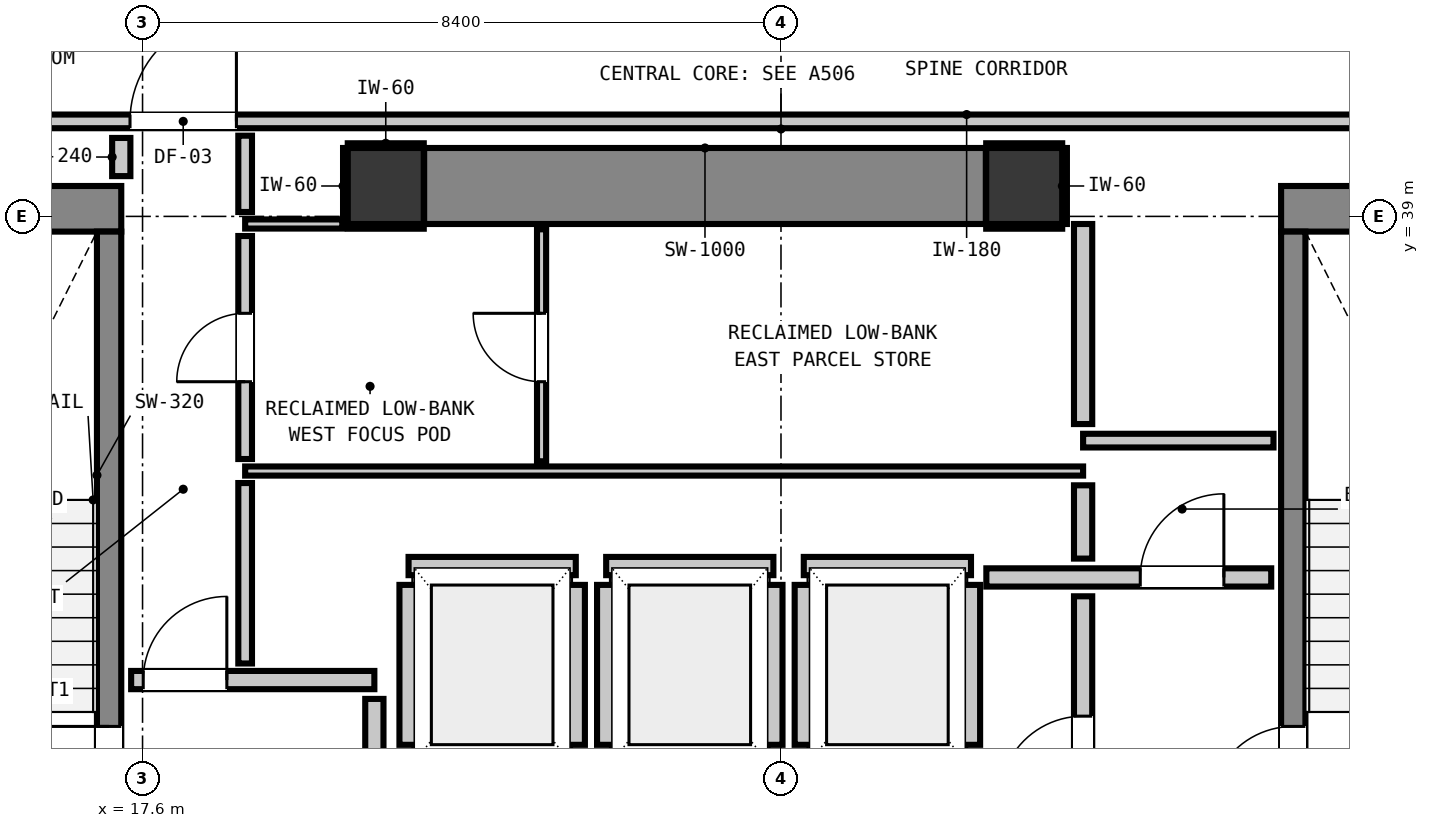
"""IFC4 building model, lengths in metres.
Left out: names, types, materials, properties, quantities, classifications, styles, units other than length and angle.
Written with IfcOpenShell. Run it as: python <this file> out.ifc"""

import sys

from ifc_helpers import new_model, si_unit, direction, frame, frame_2d, origin, origin_2d, place, context, subcontext, project, spatial, rectangle, extrude, element, fill, save


model = new_model("IFC4")
c1 = context("Model", 3, precision=1e-05, world=origin(), true_north=direction((0.0, 1.0)))
c2 = subcontext(c1, "Body", "Model", "MODEL_VIEW")
j1 = project(units=[si_unit("LENGTHUNIT", "METRE"), si_unit("PLANEANGLEUNIT", "RADIAN")], contexts=[c1])
p1 = place(None, origin())
s1 = spatial("IfcSite", under=j1, at=p1, CompositionType="ELEMENT")
p2 = place(p1, origin())
s2 = spatial("IfcBuilding", under=s1, at=p2, CompositionType="ELEMENT")
p3 = place(p2, frame((0.0, 0.0, 112.72)))
s3 = spatial("IfcBuildingStorey", under=s2, at=p3, CompositionType="ELEMENT", Elevation=112.72)
for number, where, z_axis, x_axis in (
    (1, (20.8, 39.4, 0.0), (0.0, 0.0, 1.0), (1.0, 0.0, 0.0)),
    (2, (29.2, 39.4, 0.0), (0.0, 0.0, 1.0), (1.0, 0.0, 0.0)),
):
    element("IfcColumn", number, at=place(p3, frame(where, z_axis=z_axis, x_axis=x_axis)), inside=s3, PredefinedType="COLUMN", context=c2, shape_type="SweptSolid", body=[
        extrude(rectangle(XDim=1.0, YDim=1.0, at=origin_2d()), origin(), (0.0, 0.0, 1.0), 3.32),
    ])
p4 = place(p3, frame((13.24, 39.1, 0.0), z_axis=(0.0, 0.0, 1.0), x_axis=(1.0, 0.0, 0.0)))
e3 = element("IfcWall", 3, at=p4, inside=s3, PredefinedType="SHEAR", context=c2, shape_type="SweptSolid", body=[
    extrude(rectangle(XDim=4.08, YDim=0.6, at=frame_2d((2.04, 0.0))), origin(), (0.0, 0.0, 1.0), 3.32),
])
p5 = place(p3, frame((32.58, 39.1, 0.0), z_axis=(0.0, 0.0, 1.0), x_axis=(1.0, 0.0, 0.0)))
e4 = element("IfcWall", 4, at=p5, inside=s3, PredefinedType="SHEAR", context=c2, shape_type="SweptSolid", body=[
    extrude(rectangle(XDim=4.08, YDim=0.6, at=frame_2d((2.04, 0.0))), origin(), (0.0, 0.0, 1.0), 3.32),
])
p6 = place(p3, frame((21.305, 39.4, 0.0), z_axis=(0.0, 0.0, 1.0), x_axis=(1.0, 0.0, 0.0)))
e5 = element("IfcWall", 5, at=p6, inside=s3, PredefinedType="SHEAR", context=c2, shape_type="SweptSolid", body=[
    extrude(rectangle(XDim=7.39, YDim=1.0, at=frame_2d((3.695, 0.0))), origin(), (0.0, 0.0, 1.0), 3.32),
])
p7 = place(p3, frame((17.16, 31.0, 0.0), z_axis=(0.0, 0.0, 1.0), x_axis=(0.0, 1.0, 0.0)))
e6 = element("IfcWall", 6, at=p7, inside=s3, PredefinedType="SHEAR", context=c2, shape_type="SweptSolid", body=[
    extrude(rectangle(XDim=7.8, YDim=0.32, at=frame_2d((3.9, 0.0))), origin(), (0.0, 0.0, 1.0), 3.32),
])
p8 = place(p7, frame((0.19, 0.0, 0.0)))
e7 = element("IfcOpeningElement", 7, at=p8, cuts=e6, PredefinedType="OPENING", context=c2, shape_type="SweptSolid", body=[
    extrude(rectangle(XDim=1.1, YDim=2.15, at=frame_2d((0.55, 1.075))), frame((0.0, 0.17, 0.0), z_axis=(0.0, -1.0, 0.0), x_axis=(1.0, 0.0, 0.0)), (0.0, 0.0, 1.0), 0.34),
])
p9 = place(p3, frame((32.74, 31.0, 0.0), z_axis=(0.0, 0.0, 1.0), x_axis=(0.0, 1.0, 0.0)))
e8 = element("IfcWall", 8, at=p9, inside=s3, PredefinedType="SHEAR", context=c2, shape_type="SweptSolid", body=[
    extrude(rectangle(XDim=7.8, YDim=0.32, at=frame_2d((3.9, 0.0))), origin(), (0.0, 0.0, 1.0), 3.32),
])
p10 = place(p9, frame((0.19, 0.0, 0.0)))
e9 = element("IfcOpeningElement", 9, at=p10, cuts=e8, PredefinedType="OPENING", context=c2, shape_type="SweptSolid", body=[
    extrude(rectangle(XDim=1.1, YDim=2.15, at=frame_2d((0.55, 1.075))), frame((0.0, 0.17, 0.0), z_axis=(0.0, -1.0, 0.0), x_axis=(1.0, 0.0, 0.0)), (0.0, 0.0, 1.0), 0.34),
])
p11 = place(p3, frame((21.1, 34.4, 0.0), z_axis=(0.0, 0.0, 1.0), x_axis=(1.0, 0.0, 0.0)))
e10 = element("IfcWall", 10, at=p11, inside=s3, PredefinedType="PARTITIONING", context=c2, shape_type="SweptSolid", body=[
    extrude(rectangle(XDim=2.2, YDim=0.24, at=frame_2d((1.1, 0.0))), origin(), (0.0, 0.0, 1.0), 3.08),
])
p12 = place(p3, frame((21.1, 32.048, 0.0), z_axis=(0.0, 0.0, 1.0), x_axis=(0.0, 1.0, 0.0)))
e11 = element("IfcWall", 11, at=p12, inside=s3, PredefinedType="PARTITIONING", context=c2, shape_type="SweptSolid", body=[
    extrude(rectangle(XDim=2.104, YDim=0.24, at=frame_2d((1.052, 0.0))), origin(), (0.0, 0.0, 1.0), 2.315),
])
p13 = place(p3, frame((23.3, 32.048, 0.0), z_axis=(0.0, 0.0, 1.0), x_axis=(0.0, 1.0, 0.0)))
e12 = element("IfcWall", 12, at=p13, inside=s3, PredefinedType="PARTITIONING", context=c2, shape_type="SweptSolid", body=[
    extrude(rectangle(XDim=2.104, YDim=0.24, at=frame_2d((1.052, 0.0))), origin(), (0.0, 0.0, 1.0), 3.08),
])
p14 = place(p3, frame((23.7, 34.4, 0.0), z_axis=(0.0, 0.0, 1.0), x_axis=(1.0, 0.0, 0.0)))
e13 = element("IfcWall", 13, at=p14, inside=s3, PredefinedType="PARTITIONING", context=c2, shape_type="SweptSolid", body=[
    extrude(rectangle(XDim=2.2, YDim=0.24, at=frame_2d((1.1, 0.0))), origin(), (0.0, 0.0, 1.0), 3.08),
])
for number, where, z_axis, x_axis in (
    (14, (23.7, 32.048, 0.0), (0.0, 0.0, 1.0), (0.0, 1.0, 0.0)),
    (15, (25.9, 32.048, 0.0), (0.0, 0.0, 1.0), (0.0, 1.0, 0.0)),
):
    element("IfcWall", number, at=place(p3, frame(where, z_axis=z_axis, x_axis=x_axis)), inside=s3, PredefinedType="PARTITIONING", context=c2, shape_type="SweptSolid", body=[
        extrude(rectangle(XDim=2.104, YDim=0.24, at=frame_2d((1.052, 0.0))), origin(), (0.0, 0.0, 1.0), 3.08),
    ])
p15 = place(p3, frame((26.3, 34.4, 0.0), z_axis=(0.0, 0.0, 1.0), x_axis=(1.0, 0.0, 0.0)))
e16 = element("IfcWall", 16, at=p15, inside=s3, PredefinedType="PARTITIONING", context=c2, shape_type="SweptSolid", body=[
    extrude(rectangle(XDim=2.2, YDim=0.24, at=frame_2d((1.1, 0.0))), origin(), (0.0, 0.0, 1.0), 3.08),
])
for number, where, z_axis, x_axis in (
    (17, (26.3, 32.048, 0.0), (0.0, 0.0, 1.0), (0.0, 1.0, 0.0)),
    (18, (28.5, 32.048, 0.0), (0.0, 0.0, 1.0), (0.0, 1.0, 0.0)),
):
    element("IfcWall", number, at=place(p3, frame(where, z_axis=z_axis, x_axis=x_axis)), inside=s3, PredefinedType="PARTITIONING", context=c2, shape_type="SweptSolid", body=[
        extrude(rectangle(XDim=2.104, YDim=0.24, at=frame_2d((1.052, 0.0))), origin(), (0.0, 0.0, 1.0), 3.08),
    ])
p16 = place(p3, frame((17.45, 32.9, 0.0), z_axis=(0.0, 0.0, 1.0), x_axis=(1.0, 0.0, 0.0)))
e19 = element("IfcWall", 19, at=p16, inside=s3, PredefinedType="PARTITIONING", context=c2, shape_type="SweptSolid", body=[
    extrude(rectangle(XDim=3.2, YDim=0.24, at=frame_2d((1.6, 0.0))), origin(), (0.0, 0.0, 1.0), 3.08),
])
p17 = place(p16, frame((0.159, 0.0, 0.0)))
e20 = element("IfcOpeningElement", 20, at=p17, cuts=e19, PredefinedType="OPENING", context=c2, shape_type="SweptSolid", body=[
    extrude(rectangle(XDim=1.1, YDim=2.15, at=frame_2d((0.55, 1.075))), frame((0.0, 0.13, 0.0), z_axis=(0.0, -1.0, 0.0), x_axis=(1.0, 0.0, 0.0)), (0.0, 0.0, 1.0), 0.26),
])
p18 = place(p3, frame((28.702, 34.25, 0.0), z_axis=(0.0, 0.0, 1.0), x_axis=(1.0, 0.0, 0.0)))
e21 = element("IfcWall", 21, at=p18, inside=s3, PredefinedType="PARTITIONING", context=c2, shape_type="SweptSolid", body=[
    extrude(rectangle(XDim=3.748, YDim=0.24, at=frame_2d((1.874, 0.0))), origin(), (0.0, 0.0, 1.0), 3.08),
])
p19 = place(p18, frame((2.025, 0.0, 0.0)))
e22 = element("IfcOpeningElement", 22, at=p19, cuts=e21, PredefinedType="OPENING", context=c2, shape_type="SweptSolid", body=[
    extrude(rectangle(XDim=1.1, YDim=2.15, at=frame_2d((0.55, 1.075))), frame((0.0, 0.13, 0.0), z_axis=(0.0, -1.0, 0.0), x_axis=(1.0, 0.0, 0.0)), (0.0, 0.0, 1.0), 0.26),
])
p20 = place(p3, frame((29.975, 36.05, 0.0), z_axis=(0.0, 0.0, 1.0), x_axis=(1.0, 0.0, 0.0)))
e23 = element("IfcWall", 23, at=p20, inside=s3, PredefinedType="PARTITIONING", context=c2, shape_type="SweptSolid", body=[
    extrude(rectangle(XDim=2.505, YDim=0.18, at=frame_2d((1.252, 0.0))), origin(), (0.0, 0.0, 1.0), 3.08),
])
p21 = place(p3, frame((12.979, 40.25, 0.0), z_axis=(0.0, 0.0, 1.0), x_axis=(1.0, 0.0, 0.0)))
e24 = element("IfcWall", 24, at=p21, inside=s3, PredefinedType="PARTITIONING", context=c2, shape_type="SweptSolid", body=[
    extrude(rectangle(XDim=29.614, YDim=0.18, at=frame_2d((14.807, 0.0))), origin(), (0.0, 0.0, 1.0), 3.08),
])
p22 = place(p21, frame((4.456, 0.0, 0.0)))
e25 = element("IfcOpeningElement", 25, at=p22, cuts=e24, PredefinedType="OPENING", context=c2, shape_type="SweptSolid", body=[
    extrude(rectangle(XDim=1.4, YDim=2.15, at=frame_2d((0.7, 1.075))), frame((0.0, 0.1, 0.0), z_axis=(0.0, -1.0, 0.0), x_axis=(1.0, 0.0, 0.0)), (0.0, 0.0, 1.0), 0.2),
])
p23 = place(p21, frame((25.071, 0.0, 0.0)))
e26 = element("IfcOpeningElement", 26, at=p23, cuts=e24, PredefinedType="OPENING", context=c2, shape_type="SweptSolid", body=[
    extrude(rectangle(XDim=1.4, YDim=2.15, at=frame_2d((0.7, 1.075))), frame((0.0, 0.1, 0.0), z_axis=(0.0, -1.0, 0.0), x_axis=(1.0, 0.0, 0.0)), (0.0, 0.0, 1.0), 0.2),
])
p24 = place(p3, frame((18.95, 35.65, 0.0), z_axis=(0.0, 0.0, 1.0), x_axis=(1.0, 0.0, 0.0)))
e27 = element("IfcWall", 27, at=p24, inside=s3, PredefinedType="PARTITIONING", context=c2, shape_type="SweptSolid", body=[
    extrude(rectangle(XDim=11.025, YDim=0.12, at=frame_2d((5.513, 0.0))), origin(), (0.0, 0.0, 1.0), 3.08),
])
p25 = place(p3, frame((18.95, 38.9, 0.0), z_axis=(0.0, 0.0, 1.0), x_axis=(1.0, 0.0, 0.0)))
e28 = element("IfcWall", 28, at=p25, inside=s3, PredefinedType="PARTITIONING", context=c2, shape_type="SweptSolid", body=[
    extrude(rectangle(XDim=1.278, YDim=0.12, at=frame_2d((0.639, 0.0))), origin(), (0.0, 0.0, 1.0), 3.08),
])
p26 = place(p3, frame((17.32, 39.53, 0.0), z_axis=(0.0, 0.0, 1.0), x_axis=(0.0, 1.0, 0.0)))
e29 = element("IfcWall", 29, at=p26, inside=s3, PredefinedType="PARTITIONING", context=c2, shape_type="SweptSolid", body=[
    extrude(rectangle(XDim=0.502, YDim=0.24, at=frame_2d((0.251, 0.0))), origin(), (0.0, 0.0, 1.0), 3.08),
])
p27 = place(p3, frame((20.65, 31.868, 0.0), z_axis=(0.0, 0.0, 1.0), x_axis=(0.0, 1.0, 0.0)))
e30 = element("IfcWall", 30, at=p27, inside=s3, PredefinedType="PARTITIONING", context=c2, shape_type="SweptSolid", body=[
    extrude(rectangle(XDim=0.784, YDim=0.24, at=frame_2d((0.392, 0.0))), origin(), (0.0, 0.0, 1.0), 2.315),
])
p28 = place(p3, frame((29.975, 29.768, 0.0), z_axis=(0.0, 0.0, 1.0), x_axis=(0.0, 1.0, 0.0)))
e31 = element("IfcWall", 31, at=p28, inside=s3, PredefinedType="PARTITIONING", context=c2, shape_type="SweptSolid", body=[
    extrude(rectangle(XDim=4.234, YDim=0.24, at=frame_2d((2.117, 0.0))), origin(), (0.0, 0.0, 1.0), 3.08),
])
p29 = place(p28, frame((1.557, 0.0, 0.0)))
e32 = element("IfcOpeningElement", 32, at=p29, cuts=e31, PredefinedType="OPENING", context=c2, shape_type="SweptSolid", body=[
    extrude(rectangle(XDim=1.1, YDim=2.15, at=frame_2d((0.55, 1.075))), frame((0.0, 0.13, 0.0), z_axis=(0.0, -1.0, 0.0), x_axis=(1.0, 0.0, 0.0)), (0.0, 0.0, 1.0), 0.26),
])
p30 = place(p3, frame((29.975, 34.498, 0.0), z_axis=(0.0, 0.0, 1.0), x_axis=(0.0, 1.0, 0.0)))
e33 = element("IfcWall", 33, at=p30, inside=s3, PredefinedType="PARTITIONING", context=c2, shape_type="SweptSolid", body=[
    extrude(rectangle(XDim=0.964, YDim=0.24, at=frame_2d((0.482, 0.0))), origin(), (0.0, 0.0, 1.0), 3.08),
])
p31 = place(p3, frame((29.975, 36.268, 0.0), z_axis=(0.0, 0.0, 1.0), x_axis=(0.0, 1.0, 0.0)))
e34 = element("IfcWall", 34, at=p31, inside=s3, PredefinedType="PARTITIONING", context=c2, shape_type="SweptSolid", body=[
    extrude(rectangle(XDim=2.632, YDim=0.24, at=frame_2d((1.316, 0.0))), origin(), (0.0, 0.0, 1.0), 3.08),
])
p32 = place(p3, frame((18.95, 33.118, 0.0), z_axis=(0.0, 0.0, 1.0), x_axis=(0.0, 1.0, 0.0)))
e35 = element("IfcWall", 35, at=p32, inside=s3, PredefinedType="PARTITIONING", context=c2, shape_type="SweptSolid", body=[
    extrude(rectangle(XDim=2.374, YDim=0.18, at=frame_2d((1.187, 0.0))), origin(), (0.0, 0.0, 1.0), 3.08),
])
p33 = place(p3, frame((18.95, 35.808, 0.0), z_axis=(0.0, 0.0, 1.0), x_axis=(0.0, 1.0, 0.0)))
e36 = element("IfcWall", 36, at=p33, inside=s3, PredefinedType="PARTITIONING", context=c2, shape_type="SweptSolid", body=[
    extrude(rectangle(XDim=2.934, YDim=0.18, at=frame_2d((1.467, 0.0))), origin(), (0.0, 0.0, 1.0), 3.08),
])
p34 = place(p33, frame((1.017, 0.0, 0.0)))
e37 = element("IfcOpeningElement", 37, at=p34, cuts=e36, PredefinedType="OPENING", context=c2, shape_type="SweptSolid", body=[
    extrude(rectangle(XDim=0.9, YDim=2.1, at=frame_2d((0.45, 1.05))), frame((0.0, 0.1, 0.0), z_axis=(0.0, -1.0, 0.0), x_axis=(1.0, 0.0, 0.0)), (0.0, 0.0, 1.0), 0.2),
])
p35 = place(p3, frame((18.95, 39.058, 0.0), z_axis=(0.0, 0.0, 1.0), x_axis=(0.0, 1.0, 0.0)))
e38 = element("IfcWall", 38, at=p35, inside=s3, PredefinedType="PARTITIONING", context=c2, shape_type="SweptSolid", body=[
    extrude(rectangle(XDim=1.004, YDim=0.18, at=frame_2d((0.502, 0.0))), origin(), (0.0, 0.0, 1.0), 3.08),
])
p36 = place(p3, frame((22.85, 35.778, 0.0), z_axis=(0.0, 0.0, 1.0), x_axis=(0.0, 1.0, 0.0)))
e39 = element("IfcWall", 39, at=p36, inside=s3, PredefinedType="PARTITIONING", context=c2, shape_type="SweptSolid", body=[
    extrude(rectangle(XDim=3.052, YDim=0.12, at=frame_2d((1.526, 0.0))), origin(), (0.0, 0.0, 1.0), 3.08),
])
p37 = place(p36, frame((1.047, 0.0, 0.0)))
e40 = element("IfcOpeningElement", 40, at=p37, cuts=e39, PredefinedType="OPENING", context=c2, shape_type="SweptSolid", body=[
    extrude(rectangle(XDim=0.9, YDim=2.1, at=frame_2d((0.45, 1.05))), frame((0.0, 0.07, 0.0), z_axis=(0.0, -1.0, 0.0), x_axis=(1.0, 0.0, 0.0)), (0.0, 0.0, 1.0), 0.14),
])
for number, where, z_axis, x_axis in (
    (41, (20.3, 38.868, 0.0), (0.0, 0.0, 1.0), (1.0, 0.0, 0.0)),
    (42, (20.3, 39.932, 0.0), (0.0, 0.0, 1.0), (1.0, 0.0, 0.0)),
    (43, (20.268, 38.9, 0.0), (0.0, 0.0, 1.0), (0.0, 1.0, 0.0)),
    (44, (28.7, 38.868, 0.0), (0.0, 0.0, 1.0), (1.0, 0.0, 0.0)),
    (45, (28.7, 39.932, 0.0), (0.0, 0.0, 1.0), (1.0, 0.0, 0.0)),
    (46, (29.732, 38.9, 0.0), (0.0, 0.0, 1.0), (0.0, 1.0, 0.0)),
):
    element("IfcWall", number, at=place(p3, frame(where, z_axis=z_axis, x_axis=x_axis)), inside=s3, PredefinedType="PARTITIONING", context=c2, shape_type="SweptSolid", body=[
        extrude(rectangle(XDim=1.0, YDim=0.06, at=frame_2d((0.5, 0.0))), origin(), (0.0, 0.0, 1.0), 1.45),
    ])
p38 = place(p8, origin())
e47 = element("IfcDoor", 47, at=p38, inside=s3, OperationType="SINGLE_SWING_RIGHT", PredefinedType="DOOR", context=c2, shape_type="SweptSolid", body=[
    extrude(rectangle(XDim=1.1, YDim=2.15, at=frame_2d((0.55, 1.075))), frame((0.0, 0.025, 0.0), z_axis=(0.0, -1.0, 0.0), x_axis=(1.0, 0.0, 0.0)), (0.0, 0.0, 1.0), 0.05),
])
fill(e7, e47)
p39 = place(p10, origin())
e48 = element("IfcDoor", 48, at=p39, inside=s3, OperationType="SINGLE_SWING_LEFT", PredefinedType="DOOR", context=c2, shape_type="SweptSolid", body=[
    extrude(rectangle(XDim=1.1, YDim=2.15, at=frame_2d((0.55, 1.075))), frame((0.0, 0.025, 0.0), z_axis=(0.0, -1.0, 0.0), x_axis=(1.0, 0.0, 0.0)), (0.0, 0.0, 1.0), 0.05),
])
fill(e9, e48)
p40 = place(p17, origin())
e49 = element("IfcDoor", 49, at=p40, inside=s3, OperationType="SINGLE_SWING_RIGHT", PredefinedType="DOOR", context=c2, shape_type="SweptSolid", body=[
    extrude(rectangle(XDim=1.1, YDim=2.15, at=frame_2d((0.55, 1.075))), frame((0.0, 0.025, 0.0), z_axis=(0.0, -1.0, 0.0), x_axis=(1.0, 0.0, 0.0)), (0.0, 0.0, 1.0), 0.05),
])
fill(e20, e49)
p41 = place(p29, origin())
e50 = element("IfcDoor", 50, at=p41, inside=s3, OperationType="SINGLE_SWING_LEFT", PredefinedType="DOOR", context=c2, shape_type="SweptSolid", body=[
    extrude(rectangle(XDim=1.1, YDim=2.15, at=frame_2d((0.55, 1.075))), frame((0.0, 0.025, 0.0), z_axis=(0.0, -1.0, 0.0), x_axis=(1.0, 0.0, 0.0)), (0.0, 0.0, 1.0), 0.05),
])
fill(e32, e50)
p42 = place(p19, origin())
e51 = element("IfcDoor", 51, at=p42, inside=s3, OperationType="SINGLE_SWING_RIGHT", PredefinedType="DOOR", context=c2, shape_type="SweptSolid", body=[
    extrude(rectangle(XDim=1.1, YDim=2.15, at=frame_2d((0.55, 1.075))), frame((0.0, 0.025, 0.0), z_axis=(0.0, -1.0, 0.0), x_axis=(1.0, 0.0, 0.0)), (0.0, 0.0, 1.0), 0.05),
])
fill(e22, e51)
p43 = place(p22, origin())
e52 = element("IfcDoor", 52, at=p43, inside=s3, OperationType="SINGLE_SWING_RIGHT", PredefinedType="DOOR", context=c2, shape_type="SweptSolid", body=[
    extrude(rectangle(XDim=1.4, YDim=2.15, at=frame_2d((0.7, 1.075))), frame((0.0, 0.025, 0.0), z_axis=(0.0, -1.0, 0.0), x_axis=(1.0, 0.0, 0.0)), (0.0, 0.0, 1.0), 0.05),
])
fill(e25, e52)
p44 = place(p34, origin())
e53 = element("IfcDoor", 53, at=p44, inside=s3, OperationType="SINGLE_SWING_LEFT", PredefinedType="DOOR", context=c2, shape_type="SweptSolid", body=[
    extrude(rectangle(XDim=0.9, YDim=2.1, at=frame_2d((0.45, 1.05))), frame((0.0, 0.025, 0.0), z_axis=(0.0, -1.0, 0.0), x_axis=(1.0, 0.0, 0.0)), (0.0, 0.0, 1.0), 0.05),
])
fill(e37, e53)
p45 = place(p37, origin())
e54 = element("IfcDoor", 54, at=p45, inside=s3, OperationType="SINGLE_SWING_RIGHT", PredefinedType="DOOR", context=c2, shape_type="SweptSolid", body=[
    extrude(rectangle(XDim=0.9, YDim=2.1, at=frame_2d((0.45, 1.05))), frame((0.0, 0.025, 0.0), z_axis=(0.0, -1.0, 0.0), x_axis=(1.0, 0.0, 0.0)), (0.0, 0.0, 1.0), 0.05),
])
fill(e40, e54)
save(model, sys.argv[1])
